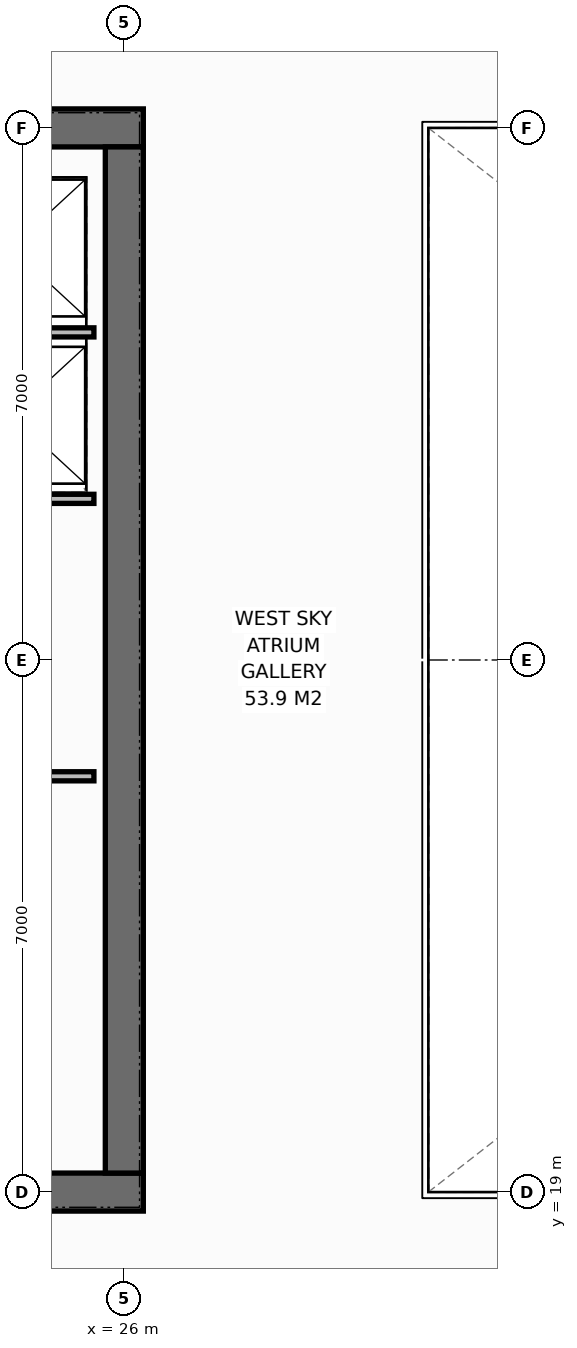
"""IFC4 building model, lengths in metres.
Left out: names, types, materials, properties, quantities, classifications, styles, units other than length and angle.
Written with IfcOpenShell. Run it as: python <this file> out.ifc"""

import sys

from ifc_helpers import new_model, si_unit, direction, frame, frame_2d, origin, place, context, subcontext, project, spatial, rectangle, extrude, element, save


model = new_model("IFC4")
c1 = context("Model", 3, precision=1e-05, world=origin(), true_north=direction((0.0, 1.0)))
c2 = subcontext(c1, "Body", "Model", "MODEL_VIEW")
j1 = project(units=[si_unit("LENGTHUNIT", "METRE"), si_unit("PLANEANGLEUNIT", "RADIAN")], contexts=[c1])
p1 = place(None, origin())
s1 = spatial("IfcSite", under=j1, at=p1, CompositionType="ELEMENT")
p2 = place(p1, origin())
s2 = spatial("IfcBuilding", under=s1, at=p2, CompositionType="ELEMENT")
p3 = place(p2, frame((0.0, 0.0, 294.4)))
s3 = spatial("IfcBuildingStorey", under=s2, at=p3, CompositionType="ELEMENT", Elevation=294.4)
p4 = place(p3, frame((12.75, 19.0, 0.0), z_axis=(0.0, 0.0, 1.0), x_axis=(1.0, 0.0, 0.0)))
e1 = element("IfcWall", 1, at=p4, inside=s3, PredefinedType="SHEAR", context=c2, shape_type="SweptSolid", body=[
    extrude(rectangle(XDim=13.5, YDim=0.5, at=frame_2d((6.75, 0.0))), origin(), (0.0, 0.0, 1.0), 4.0),
])
p5 = place(p4, frame((9.13, 0.0, 0.0)))
e2 = element("IfcOpeningElement", 2, at=p5, cuts=e1, PredefinedType="OPENING", context=c2, shape_type="SweptSolid", body=[
    extrude(rectangle(XDim=1.4, YDim=2.2, at=frame_2d((0.7, 1.1))), frame((0.0, 0.26, 0.0), z_axis=(0.0, -1.0, 0.0), x_axis=(1.0, 0.0, 0.0)), (0.0, 0.0, 1.0), 0.52),
])
p6 = place(p3, frame((12.75, 33.0, 0.0), z_axis=(0.0, 0.0, 1.0), x_axis=(1.0, 0.0, 0.0)))
e3 = element("IfcWall", 3, at=p6, inside=s3, PredefinedType="SHEAR", context=c2, shape_type="SweptSolid", body=[
    extrude(rectangle(XDim=13.5, YDim=0.5, at=frame_2d((6.75, 0.0))), origin(), (0.0, 0.0, 1.0), 4.0),
])
p7 = place(p6, frame((1.15, 0.0, 0.0)))
e4 = element("IfcOpeningElement", 4, at=p7, cuts=e3, PredefinedType="OPENING", context=c2, shape_type="SweptSolid", body=[
    extrude(rectangle(XDim=0.9, YDim=2.15, at=frame_2d((0.45, 1.075))), frame((0.0, 0.26, 0.0), z_axis=(0.0, -1.0, 0.0), x_axis=(1.0, 0.0, 0.0)), (0.0, 0.0, 1.0), 0.52),
])
p8 = place(p6, frame((3.75, 0.0, 0.0)))
e5 = element("IfcOpeningElement", 5, at=p8, cuts=e3, PredefinedType="OPENING", context=c2, shape_type="SweptSolid", body=[
    extrude(rectangle(XDim=0.95, YDim=2.15, at=frame_2d((0.475, 1.075))), frame((0.0, 0.26, 0.0), z_axis=(0.0, -1.0, 0.0), x_axis=(1.0, 0.0, 0.0)), (0.0, 0.0, 1.0), 0.52),
])
p9 = place(p6, frame((6.75, 0.0, 0.0)))
e6 = element("IfcOpeningElement", 6, at=p9, cuts=e3, PredefinedType="OPENING", context=c2, shape_type="SweptSolid", body=[
    extrude(rectangle(XDim=0.95, YDim=2.15, at=frame_2d((0.475, 1.075))), frame((0.0, 0.26, 0.0), z_axis=(0.0, -1.0, 0.0), x_axis=(1.0, 0.0, 0.0)), (0.0, 0.0, 1.0), 0.52),
])
p10 = place(p6, frame((9.13, 0.0, 0.0)))
e7 = element("IfcOpeningElement", 7, at=p10, cuts=e3, PredefinedType="OPENING", context=c2, shape_type="SweptSolid", body=[
    extrude(rectangle(XDim=1.4, YDim=2.2, at=frame_2d((0.7, 1.1))), frame((0.0, 0.26, 0.0), z_axis=(0.0, -1.0, 0.0), x_axis=(1.0, 0.0, 0.0)), (0.0, 0.0, 1.0), 0.52),
])
p11 = place(p3, frame((26.0, 19.25, 0.0), z_axis=(0.0, 0.0, 1.0), x_axis=(0.0, 1.0, 0.0)))
e8 = element("IfcWall", 8, at=p11, inside=s3, PredefinedType="SHEAR", context=c2, shape_type="SweptSolid", body=[
    extrude(rectangle(XDim=13.5, YDim=0.5, at=frame_2d((6.75, 0.0))), origin(), (0.0, 0.0, 1.0), 4.0),
])
for number, where, z_axis, x_axis in (
    (9, (23.4, 24.47, 0.0), (0.0, 0.0, 1.0), (1.0, 0.0, 0.0)),
    (10, (23.4, 28.12, 0.0), (0.0, 0.0, 1.0), (1.0, 0.0, 0.0)),
    (11, (23.4, 30.31, 0.0), (0.0, 0.0, 1.0), (1.0, 0.0, 0.0)),
):
    element("IfcWall", number, at=place(p3, frame(where, z_axis=z_axis, x_axis=x_axis)), inside=s3, PredefinedType="PARTITIONING", context=c2, shape_type="SweptSolid", body=[
        extrude(rectangle(XDim=2.2, YDim=0.12, at=frame_2d((1.1, 0.0))), origin(), (0.0, 0.0, 1.0), 3.788),
    ])
save(model, sys.argv[1])
